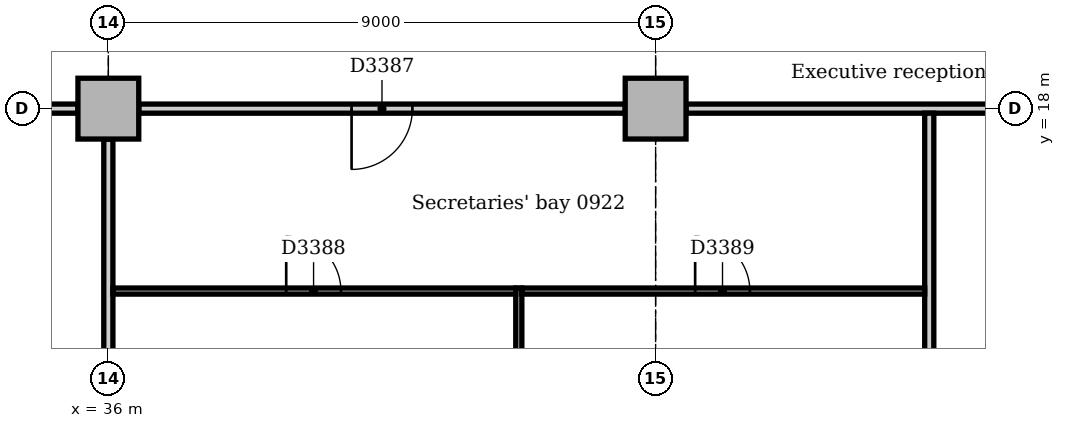
"""IFC4 building model, lengths in metres.
Left out: names, types, materials, properties, quantities, classifications, styles, units other than length and angle.
Written with IfcOpenShell. Run it as: python <this file> out.ifc"""

import sys

from ifc_helpers import new_model, si_unit, direction, frame, frame_2d, origin, origin_2d, place, context, subcontext, project, spatial, rectangle, extrude, element, fill, save


model = new_model("IFC4")
c1 = context("Model", 3, precision=1e-05, world=origin(), true_north=direction((0.0, 1.0)))
c2 = subcontext(c1, "Body", "Model", "MODEL_VIEW")
j1 = project(units=[si_unit("LENGTHUNIT", "METRE"), si_unit("PLANEANGLEUNIT", "RADIAN")], contexts=[c1])
p1 = place(None, origin())
s1 = spatial("IfcSite", under=j1, at=p1, CompositionType="ELEMENT")
p2 = place(p1, origin())
s2 = spatial("IfcBuilding", under=s1, at=p2, CompositionType="ELEMENT")
p3 = place(p2, frame((0.0, 0.0, 42.0)))
s3 = spatial("IfcBuildingStorey", under=s2, at=p3, CompositionType="ELEMENT", Elevation=42.0)
for number, where, z_axis, x_axis in (
    (1, (36.0, 18.0, 0.0), (0.0, 0.0, 1.0), (1.0, 0.0, 0.0)),
    (2, (45.0, 18.0, 0.0), (0.0, 0.0, 1.0), (1.0, 0.0, 0.0)),
):
    element("IfcColumn", number, at=place(p3, frame(where, z_axis=z_axis, x_axis=x_axis)), inside=s3, PredefinedType="COLUMN", context=c2, shape_type="SweptSolid", body=[
        extrude(rectangle(XDim=1.0, YDim=1.0, at=origin_2d()), origin(), (0.0, 0.0, 1.0), 3.7),
    ])
p4 = place(p3, frame((45.5, 18.0, 0.0), z_axis=(0.0, 0.0, 1.0), x_axis=(1.0, 0.0, 0.0)))
e3 = element("IfcWall", 3, at=p4, inside=s3, PredefinedType="PARTITIONING", context=c2, shape_type="SweptSolid", body=[
    extrude(rectangle(XDim=8.0, YDim=0.15, at=frame_2d((4.0, 0.0))), origin(), (0.0, 0.0, 1.0), 3.0),
])
p5 = place(p3, frame((36.5, 18.0, 0.0), z_axis=(0.0, 0.0, 1.0), x_axis=(1.0, 0.0, 0.0)))
e4 = element("IfcWall", 4, at=p5, inside=s3, PredefinedType="PARTITIONING", context=c2, shape_type="SweptSolid", body=[
    extrude(rectangle(XDim=8.0, YDim=0.15, at=frame_2d((4.0, 0.0))), origin(), (0.0, 0.0, 1.0), 3.0),
])
p6 = place(p5, frame((3.5, 0.0, 0.0)))
e5 = element("IfcOpeningElement", 5, at=p6, cuts=e4, PredefinedType="OPENING", context=c2, shape_type="SweptSolid", body=[
    extrude(rectangle(XDim=1.0, YDim=2.1, at=frame_2d((0.5, 1.05))), frame((0.0, 0.085, 0.0), z_axis=(0.0, -1.0, 0.0), x_axis=(1.0, 0.0, 0.0)), (0.0, 0.0, 1.0), 0.17),
])
p7 = place(p3, frame((27.5, 18.0, 0.0), z_axis=(0.0, 0.0, 1.0), x_axis=(1.0, 0.0, 0.0)))
e6 = element("IfcWall", 6, at=p7, inside=s3, PredefinedType="PARTITIONING", context=c2, shape_type="SweptSolid", body=[
    extrude(rectangle(XDim=8.0, YDim=0.15, at=frame_2d((4.0, 0.0))), origin(), (0.0, 0.0, 1.0), 3.0),
])
p8 = place(p7, frame((3.5, 0.0, 0.0)))
e7 = element("IfcOpeningElement", 7, at=p8, cuts=e6, PredefinedType="OPENING", context=c2, shape_type="SweptSolid", body=[
    extrude(rectangle(XDim=1.0, YDim=2.1, at=frame_2d((0.5, 1.05))), frame((0.0, 0.085, 0.0), z_axis=(0.0, -1.0, 0.0), x_axis=(1.0, 0.0, 0.0)), (0.0, 0.0, 1.0), 0.17),
])
p9 = place(p3, frame((36.0, 9.5, 0.0), z_axis=(0.0, 0.0, 1.0), x_axis=(0.0, 1.0, 0.0)))
e8 = element("IfcWall", 8, at=p9, inside=s3, PredefinedType="PARTITIONING", context=c2, shape_type="SweptSolid", body=[
    extrude(rectangle(XDim=8.0, YDim=0.15, at=frame_2d((4.0, 0.0))), origin(), (0.0, 0.0, 1.0), 3.008),
])
p10 = place(p3, frame((49.5, 0.716, 0.0), z_axis=(0.0, 0.0, 1.0), x_axis=(0.0, 1.0, 0.0)))
e9 = element("IfcWall", 9, at=p10, inside=s3, PredefinedType="PARTITIONING", context=c2, shape_type="SweptSolid", body=[
    extrude(rectangle(XDim=17.209, YDim=0.15, at=frame_2d((8.604, 0.0))), origin(), (0.0, 0.0, 1.0), 3.7),
])
p11 = place(p3, frame((42.75, 0.36, 0.0), z_axis=(0.0, 0.0, 1.0), x_axis=(0.0, 1.0, 0.0)))
e10 = element("IfcWall", 10, at=p11, inside=s3, PredefinedType="PARTITIONING", context=c2, shape_type="SweptSolid", body=[
    extrude(rectangle(XDim=14.69, YDim=0.1, at=frame_2d((7.345, 0.0))), origin(), (0.0, 0.0, 1.0), 3.7),
])
p12 = place(p3, frame((36.075, 15.0, 0.0), z_axis=(0.0, 0.0, 1.0), x_axis=(1.0, 0.0, 0.0)))
e11 = element("IfcWall", 11, at=p12, inside=s3, PredefinedType="PARTITIONING", context=c2, shape_type="SweptSolid", body=[
    extrude(rectangle(XDim=6.625, YDim=0.1, at=frame_2d((3.312, 0.0))), origin(), (0.0, 0.0, 1.0), 3.7),
])
p13 = place(p12, frame((2.85, 0.0, 0.0)))
e12 = element("IfcOpeningElement", 12, at=p13, cuts=e11, PredefinedType="OPENING", context=c2, shape_type="SweptSolid", body=[
    extrude(rectangle(XDim=0.9, YDim=2.1, at=frame_2d((0.45, 1.05))), frame((0.0, 0.06, 0.0), z_axis=(0.0, -1.0, 0.0), x_axis=(1.0, 0.0, 0.0)), (0.0, 0.0, 1.0), 0.12),
])
p14 = place(p3, frame((42.8, 15.0, 0.0), z_axis=(0.0, 0.0, 1.0), x_axis=(1.0, 0.0, 0.0)))
e13 = element("IfcWall", 13, at=p14, inside=s3, PredefinedType="PARTITIONING", context=c2, shape_type="SweptSolid", body=[
    extrude(rectangle(XDim=6.625, YDim=0.1, at=frame_2d((3.312, 0.0))), origin(), (0.0, 0.0, 1.0), 3.7),
])
p15 = place(p14, frame((2.85, 0.0, 0.0)))
e14 = element("IfcOpeningElement", 14, at=p15, cuts=e13, PredefinedType="OPENING", context=c2, shape_type="SweptSolid", body=[
    extrude(rectangle(XDim=0.9, YDim=2.1, at=frame_2d((0.45, 1.05))), frame((0.0, 0.06, 0.0), z_axis=(0.0, -1.0, 0.0), x_axis=(1.0, 0.0, 0.0)), (0.0, 0.0, 1.0), 0.12),
])
p16 = place(p6, frame((1.0, 0.0, 0.0), z_axis=(0.0, 0.0, 1.0), x_axis=(-1.0, 0.0, 0.0)))
e15 = element("IfcDoor", 15, at=p16, inside=s3, OperationType="SINGLE_SWING_RIGHT", PredefinedType="DOOR", context=c2, shape_type="SweptSolid", body=[
    extrude(rectangle(XDim=1.0, YDim=2.1, at=frame_2d((0.5, 1.05))), frame((0.0, 0.025, 0.0), z_axis=(0.0, -1.0, 0.0), x_axis=(1.0, 0.0, 0.0)), (0.0, 0.0, 1.0), 0.05),
])
fill(e5, e15)
p17 = place(p13, origin())
e16 = element("IfcDoor", 16, at=p17, inside=s3, OperationType="SINGLE_SWING_LEFT", PredefinedType="DOOR", context=c2, shape_type="SweptSolid", body=[
    extrude(rectangle(XDim=0.9, YDim=2.1, at=frame_2d((0.45, 1.05))), frame((0.0, 0.025, 0.0), z_axis=(0.0, -1.0, 0.0), x_axis=(1.0, 0.0, 0.0)), (0.0, 0.0, 1.0), 0.05),
])
fill(e12, e16)
p18 = place(p15, origin())
e17 = element("IfcDoor", 17, at=p18, inside=s3, OperationType="SINGLE_SWING_LEFT", PredefinedType="DOOR", context=c2, shape_type="SweptSolid", body=[
    extrude(rectangle(XDim=0.9, YDim=2.1, at=frame_2d((0.45, 1.05))), frame((0.0, 0.025, 0.0), z_axis=(0.0, -1.0, 0.0), x_axis=(1.0, 0.0, 0.0)), (0.0, 0.0, 1.0), 0.05),
])
fill(e14, e17)
save(model, sys.argv[1])
